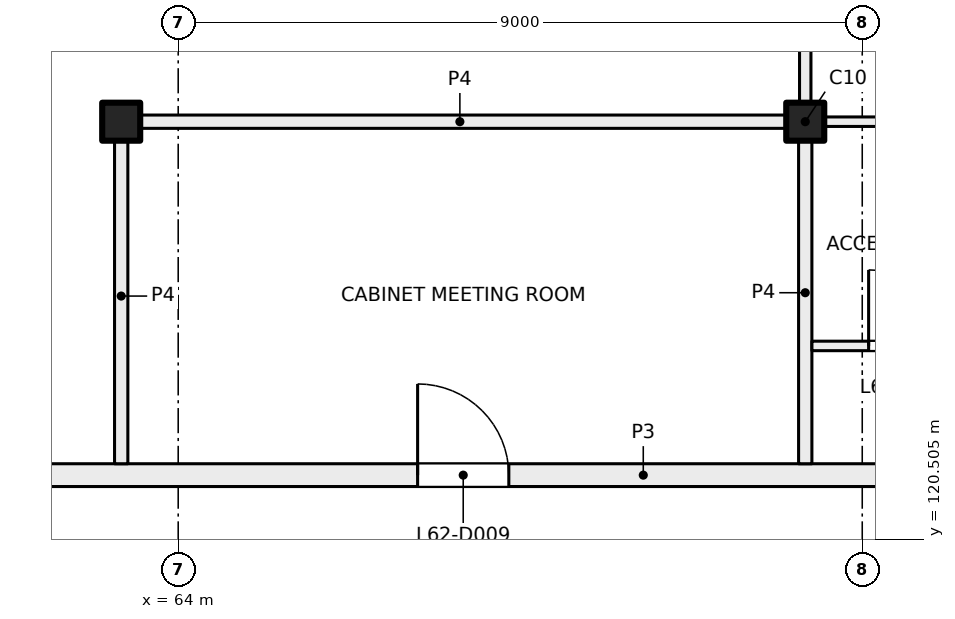
"""IFC4 building model, lengths in metres.
Left out: names, types, materials, properties, quantities, classifications, styles, units other than length and angle.
Written with IfcOpenShell. Run it as: python <this file> out.ifc"""

import sys

from ifc_helpers import new_model, si_unit, direction, frame, frame_2d, origin, origin_2d, place, context, subcontext, project, spatial, rectangle, extrude, element, fill, save


model = new_model("IFC4")
c1 = context("Model", 3, precision=1e-05, world=origin(), true_north=direction((0.0, 1.0)))
c2 = subcontext(c1, "Body", "Model", "MODEL_VIEW")
j1 = project(units=[si_unit("LENGTHUNIT", "METRE"), si_unit("PLANEANGLEUNIT", "RADIAN")], contexts=[c1])
p1 = place(None, origin())
s1 = spatial("IfcSite", under=j1, at=p1, CompositionType="ELEMENT")
p2 = place(p1, origin())
s2 = spatial("IfcBuilding", under=s1, at=p2, CompositionType="ELEMENT")
p3 = place(p2, frame((0.0, 0.0, 261.5)))
s3 = spatial("IfcBuildingStorey", under=s2, at=p3, CompositionType="ELEMENT", Elevation=261.5)
for number, where, z_axis, x_axis in (
    (1, (63.25, 126.0, 0.0), (0.0, 0.0, 1.0), (1.0, 0.0, 0.0)),
    (2, (72.25, 126.0, 0.0), (0.0, 0.0, 1.0), (1.0, 0.0, 0.0)),
):
    element("IfcColumn", number, at=place(p3, frame(where, z_axis=z_axis, x_axis=x_axis)), inside=s3, PredefinedType="COLUMN", context=c2, shape_type="SweptSolid", body=[
        extrude(rectangle(XDim=0.5, YDim=0.5, at=origin_2d()), origin(), (0.0, 0.0, 1.0), 4.0),
    ])
p4 = place(p3, frame((54.4, 121.35, 0.0), z_axis=(0.0, 0.0, 1.0), x_axis=(1.0, 0.0, 0.0)))
e3 = element("IfcWall", 3, at=p4, inside=s3, PredefinedType="PARTITIONING", context=c2, shape_type="SweptSolid", body=[
    extrude(rectangle(XDim=31.438, YDim=0.3, at=frame_2d((15.719, 0.0))), origin(), (0.0, 0.0, 1.0), 3.625),
])
p5 = place(p4, frame((21.85, 0.0, 0.0)))
e4 = element("IfcOpeningElement", 4, at=p5, cuts=e3, PredefinedType="OPENING", context=c2, shape_type="SweptSolid", body=[
    extrude(rectangle(XDim=1.0, YDim=2.1, at=frame_2d((0.5, 1.05))), frame((0.0, 0.16, 0.0), z_axis=(0.0, -1.0, 0.0), x_axis=(1.0, 0.0, 0.0)), (0.0, 0.0, 1.0), 0.32),
])
p6 = place(p4, frame((12.75, 0.0, 0.0)))
e5 = element("IfcOpeningElement", 5, at=p6, cuts=e3, PredefinedType="OPENING", context=c2, shape_type="SweptSolid", body=[
    extrude(rectangle(XDim=1.2, YDim=2.1, at=frame_2d((0.6, 1.05))), frame((0.0, 0.16, 0.0), z_axis=(0.0, -1.0, 0.0), x_axis=(1.0, 0.0, 0.0)), (0.0, 0.0, 1.0), 0.32),
])
p7 = place(p4, frame((3.515, 0.0, 0.0)))
e6 = element("IfcOpeningElement", 6, at=p7, cuts=e3, PredefinedType="OPENING", context=c2, shape_type="SweptSolid", body=[
    extrude(rectangle(XDim=1.8, YDim=2.1, at=frame_2d((0.9, 1.05))), frame((0.0, 0.16, 0.0), z_axis=(0.0, -1.0, 0.0), x_axis=(1.0, 0.0, 0.0)), (0.0, 0.0, 1.0), 0.32),
])
p8 = place(p3, frame((63.25, 125.912, 0.0), z_axis=(0.0, 0.0, 1.0), x_axis=(0.0, -1.0, 0.0)))
e7 = element("IfcWall", 7, at=p8, inside=s3, PredefinedType="PARTITIONING", context=c2, shape_type="SweptSolid", body=[
    extrude(rectangle(XDim=4.412, YDim=0.175, at=frame_2d((2.206, 0.0))), origin(), (0.0, 0.0, 1.0), 3.625),
])
p9 = place(p3, frame((72.25, 121.5, 0.0), z_axis=(0.0, 0.0, 1.0), x_axis=(0.0, 1.0, 0.0)))
e8 = element("IfcWall", 8, at=p9, inside=s3, PredefinedType="PARTITIONING", context=c2, shape_type="SweptSolid", body=[
    extrude(rectangle(XDim=4.5, YDim=0.175, at=frame_2d((2.25, 0.0))), origin(), (0.0, 0.0, 1.0), 3.625),
])
p10 = place(p3, frame((72.338, 123.05, 0.0), z_axis=(0.0, 0.0, 1.0), x_axis=(1.0, 0.0, 0.0)))
e9 = element("IfcWall", 9, at=p10, inside=s3, PredefinedType="PARTITIONING", context=c2, shape_type="SweptSolid", body=[
    extrude(rectangle(XDim=8.824, YDim=0.125, at=frame_2d((4.412, 0.0))), origin(), (0.0, 0.0, 1.0), 3.625),
])
p11 = place(p10, frame((6.778, 0.0, 0.0)))
e10 = element("IfcOpeningElement", 10, at=p11, cuts=e9, PredefinedType="OPENING", context=c2, shape_type="SweptSolid", body=[
    extrude(rectangle(XDim=0.8, YDim=2.1, at=frame_2d((0.4, 1.05))), frame((0.0, 0.073, 0.0), z_axis=(0.0, -1.0, 0.0), x_axis=(1.0, 0.0, 0.0)), (0.0, 0.0, 1.0), 0.145),
])
p12 = place(p10, frame((3.612, 0.0, 0.0)))
e11 = element("IfcOpeningElement", 11, at=p12, cuts=e9, PredefinedType="OPENING", context=c2, shape_type="SweptSolid", body=[
    extrude(rectangle(XDim=0.8, YDim=2.1, at=frame_2d((0.4, 1.05))), frame((0.0, 0.073, 0.0), z_axis=(0.0, -1.0, 0.0), x_axis=(1.0, 0.0, 0.0)), (0.0, 0.0, 1.0), 0.145),
])
p13 = place(p10, frame((0.746, 0.0, 0.0)))
e12 = element("IfcOpeningElement", 12, at=p13, cuts=e9, PredefinedType="OPENING", context=c2, shape_type="SweptSolid", body=[
    extrude(rectangle(XDim=1.0, YDim=2.1, at=frame_2d((0.5, 1.05))), frame((0.0, 0.073, 0.0), z_axis=(0.0, -1.0, 0.0), x_axis=(1.0, 0.0, 0.0)), (0.0, 0.0, 1.0), 0.145),
])
p14 = place(p3, frame((72.25, 126.0, 0.0), z_axis=(0.0, 0.0, 1.0), x_axis=(-1.0, 0.0, 0.0)))
e13 = element("IfcWall", 13, at=p14, inside=s3, PredefinedType="PARTITIONING", context=c2, shape_type="SweptSolid", body=[
    extrude(rectangle(XDim=9.088, YDim=0.175, at=frame_2d((4.544, 0.0))), origin(), (0.0, 0.0, 1.0), 3.625),
])
p15 = place(p3, frame((72.25, 126.0, 0.0), z_axis=(0.0, 0.0, 1.0), x_axis=(0.0, 1.0, 0.0)))
e14 = element("IfcWall", 14, at=p15, inside=s3, PredefinedType="PARTITIONING", context=c2, shape_type="SweptSolid", body=[
    extrude(rectangle(XDim=3.9, YDim=0.15, at=frame_2d((1.95, 0.0))), origin(), (0.0, 0.0, 1.0), 3.625),
])
p16 = place(p15, frame((1.05, 0.0, 0.0)))
e15 = element("IfcOpeningElement", 15, at=p16, cuts=e14, PredefinedType="OPENING", context=c2, shape_type="SweptSolid", body=[
    extrude(rectangle(XDim=1.8, YDim=2.1, at=frame_2d((0.9, 1.05))), frame((0.0, 0.085, 0.0), z_axis=(0.0, -1.0, 0.0), x_axis=(1.0, 0.0, 0.0)), (0.0, 0.0, 1.0), 0.17),
])
p17 = place(p3, frame((72.25, 126.0, 0.0), z_axis=(0.0, 0.0, 1.0), x_axis=(1.0, 0.0, 0.0)))
e16 = element("IfcWall", 16, at=p17, inside=s3, PredefinedType="PARTITIONING", context=c2, shape_type="SweptSolid", body=[
    extrude(rectangle(XDim=8.912, YDim=0.125, at=frame_2d((4.456, 0.0))), origin(), (0.0, 0.0, 1.0), 3.625),
])
p18 = place(p13, origin())
e17 = element("IfcDoor", 17, at=p18, inside=s3, OperationType="SINGLE_SWING_LEFT", PredefinedType="DOOR", context=c2, shape_type="SweptSolid", body=[
    extrude(rectangle(XDim=1.0, YDim=2.1, at=frame_2d((0.5, 1.05))), frame((0.0, 0.025, 0.0), z_axis=(0.0, -1.0, 0.0), x_axis=(1.0, 0.0, 0.0)), (0.0, 0.0, 1.0), 0.05),
])
fill(e12, e17)
p19 = place(p6, origin())
e18 = element("IfcDoor", 18, at=p19, inside=s3, OperationType="DOUBLE_DOOR_SINGLE_SWING", PredefinedType="DOOR", context=c2, shape_type="SweptSolid", body=[
    extrude(rectangle(XDim=1.2, YDim=2.1, at=frame_2d((0.6, 1.05))), frame((0.0, 0.025, 0.0), z_axis=(0.0, -1.0, 0.0), x_axis=(1.0, 0.0, 0.0)), (0.0, 0.0, 1.0), 0.05),
])
fill(e5, e18)
save(model, sys.argv[1])
